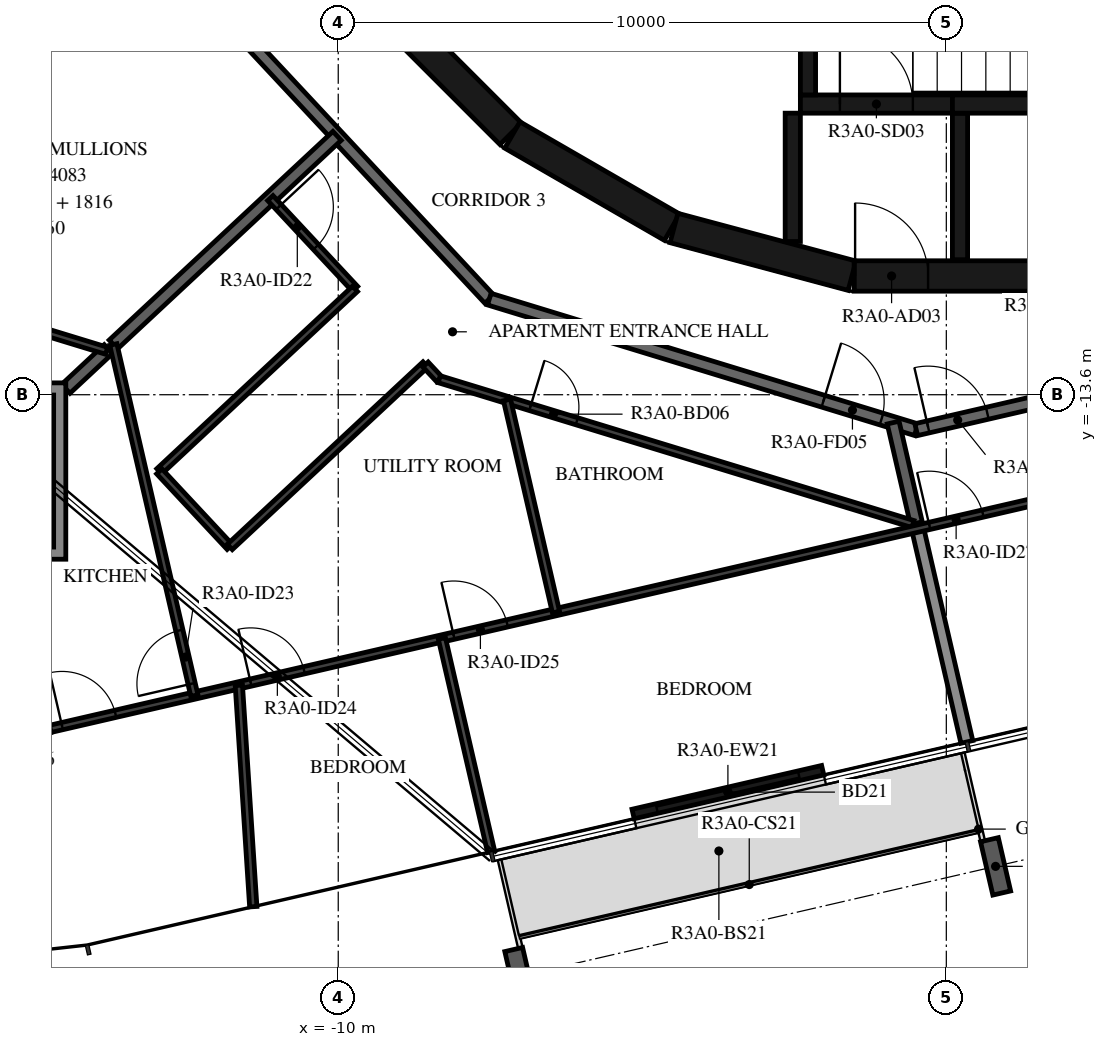
"""IFC4 building model, lengths in metres.
Left out: names, types, materials, properties, quantities, classifications, styles, units other than length and angle.
Written with IfcOpenShell. Run it as: python <this file> out.ifc"""

import sys

from ifc_helpers import new_model, si_unit, direction, frame, frame_2d, origin, origin_2d, place, context, subcontext, project, spatial, polyline, rectangle, i_section, outline, extrude, element, fill, save


model = new_model("IFC4")
c1 = context("Model", 3, precision=1e-05, world=origin(), true_north=direction((0.0, 1.0)))
c2 = subcontext(c1, "Body", "Model", "MODEL_VIEW")
j1 = project(units=[si_unit("LENGTHUNIT", "METRE"), si_unit("PLANEANGLEUNIT", "RADIAN")], contexts=[c1])
p1 = place(None, origin())
s1 = spatial("IfcSite", under=j1, at=p1, CompositionType="ELEMENT")
p2 = place(p1, origin())
s2 = spatial("IfcBuilding", under=s1, at=p2, CompositionType="ELEMENT")
p3 = place(p2, frame((0.0, 0.0, 120.4)))
s3 = spatial("IfcBuildingStorey", under=s2, at=p3, CompositionType="ELEMENT", Elevation=120.4)
for number, where, z_axis, x_axis in (
    (1, (-7.013, -23.162, -0.38), (0.0, 0.0, 1.0), (-0.974, -0.225, 0.0)),
    (2, (0.81, -21.356, -0.38), (0.0, 0.0, 1.0), (-0.974, -0.225, 0.0)),
):
    element("IfcColumn", number, at=place(p3, frame(where, z_axis=z_axis, x_axis=x_axis)), inside=s3, PredefinedType="COLUMN", context=c2, shape_type="SweptSolid", body=[
        extrude(i_section(OverallWidth=0.3, OverallDepth=0.9, WebThickness=0.019, FlangeThickness=0.035, FilletRadius=0.03, at=origin_2d()), origin(), (0.0, 0.0, 1.0), 3.5),
    ])
p4 = place(p3, frame((-5.151, -20.495, 0.0), z_axis=(0.0, 0.0, 1.0), x_axis=(0.974377048991, 0.224920800284, 0.0)))
e3 = element("IfcWall", 3, at=p4, inside=s3, PredefinedType="STANDARD", context=c2, shape_type="SweptSolid", body=[
    extrude(rectangle(XDim=3.2, YDim=0.16, at=frame_2d((1.6, 0.0))), origin(), (0.0, 0.0, 1.0), 3.12),
])
p5 = place(p4, frame((0.4, 0.0, 0.0)))
e4 = element("IfcOpeningElement", 4, at=p5, cuts=e3, PredefinedType="OPENING", context=c2, shape_type="SweptSolid", body=[
    extrude(rectangle(XDim=2.4, YDim=2.4, at=frame_2d((1.2, 1.2))), frame((0.0, 0.09, 0.0), z_axis=(0.0, -1.0, 0.0), x_axis=(1.0, 0.0, 0.0)), (0.0, 0.0, 1.0), 0.18),
])
p6 = place(p3, frame((-9.308, -7.164, 0.0), z_axis=(0.0, 0.0, 1.0), x_axis=(0.707106781187, -0.707106781187, 0.0)))
e5 = element("IfcWall", 5, at=p6, inside=s3, PredefinedType="SHEAR", context=c2, shape_type="SweptSolid", body=[
    extrude(rectangle(XDim=3.032, YDim=0.5, at=frame_2d((1.516, 0.0))), origin(), (0.0, 0.0, 1.0), 3.12),
])
for number, where, z_axis, x_axis in (
    (6, (-7.137, -9.329, 0.0), (0.0, 0.0, 1.0), (0.866, -0.5, 0.0)),
    (7, (-4.479, -10.858, 0.0), (0.0, 0.0, 1.0), (0.966, -0.259, 0.0)),
):
    element("IfcWall", number, at=place(p3, frame(where, z_axis=z_axis, x_axis=x_axis)), inside=s3, PredefinedType="SHEAR", context=c2, shape_type="SweptSolid", body=[
        extrude(rectangle(XDim=3.033, YDim=0.5, at=frame_2d((1.516, 0.0))), origin(), (0.0, 0.0, 1.0), 3.12),
    ])
p7 = place(p3, frame((-1.516, -11.647, 0.0), z_axis=(0.0, 0.0, 1.0), x_axis=(1.0, 0.0, 0.0)))
e8 = element("IfcWall", 8, at=p7, inside=s3, PredefinedType="SHEAR", context=c2, shape_type="SweptSolid", body=[
    extrude(rectangle(XDim=3.033, YDim=0.5, at=frame_2d((1.516, 0.0))), origin(), (0.0, 0.0, 1.0), 3.12),
])
p8 = place(p7, frame((0.016, 0.0, 0.0)))
e9 = element("IfcOpeningElement", 9, at=p8, cuts=e8, PredefinedType="OPENING", context=c2, shape_type="SweptSolid", body=[
    extrude(rectangle(XDim=1.2, YDim=2.1, at=frame_2d((0.6, 1.05))), frame((0.0, 0.26, 0.0), z_axis=(0.0, -1.0, 0.0), x_axis=(1.0, 0.0, 0.0)), (0.0, 0.0, 1.0), 0.52),
])
p9 = place(p3, frame((-2.275, -8.67, 0.0), z_axis=(0.0, 0.0, 1.0), x_axis=(0.0, 1.0, 0.0)))
e10 = element("IfcWall", 10, at=p9, inside=s3, PredefinedType="SHEAR", context=c2, shape_type="SweptSolid", body=[
    extrude(rectangle(XDim=3.32, YDim=0.25, at=frame_2d((1.66, 0.0))), origin(), (0.0, 0.0, 1.0), 3.12),
])
p10 = place(p3, frame((0.1, -8.82, 0.0), z_axis=(0.0, 0.0, 1.0), x_axis=(1.0, 0.0, 0.0)))
e11 = element("IfcWall", 11, at=p10, inside=s3, PredefinedType="SHEAR", context=c2, shape_type="SweptSolid", body=[
    extrude(rectangle(XDim=4.55, YDim=0.3, at=frame_2d((2.275, 0.0))), origin(), (0.0, 0.0, 1.0), 3.12),
])
p11 = place(p3, frame((-2.4, -8.82, 0.0), z_axis=(0.0, 0.0, 1.0), x_axis=(1.0, 0.0, 0.0)))
e12 = element("IfcWall", 12, at=p11, inside=s3, PredefinedType="SHEAR", context=c2, shape_type="SweptSolid", body=[
    extrude(rectangle(XDim=2.5, YDim=0.3, at=frame_2d((1.25, 0.0))), origin(), (0.0, 0.0, 1.0), 3.12),
])
p12 = place(p11, frame((0.65, 0.0, 0.0)))
e13 = element("IfcOpeningElement", 13, at=p12, cuts=e12, PredefinedType="OPENING", context=c2, shape_type="SweptSolid", body=[
    extrude(rectangle(XDim=1.2, YDim=2.1, at=frame_2d((0.6, 1.05))), frame((0.0, 0.16, 0.0), z_axis=(0.0, -1.0, 0.0), x_axis=(1.0, 0.0, 0.0)), (0.0, 0.0, 1.0), 0.32),
])
p13 = place(p3, frame((-2.525, -8.97, 0.0), z_axis=(0.0, 0.0, 1.0), x_axis=(0.0, -1.0, 0.0)))
e14 = element("IfcWall", 14, at=p13, inside=s3, PredefinedType="SHEAR", context=c2, shape_type="SweptSolid", body=[
    extrude(rectangle(XDim=2.11, YDim=0.25, at=frame_2d((1.055, 0.0))), origin(), (0.0, 0.0, 1.0), 3.12),
])
p14 = place(p3, frame((0.225, -8.97, 0.0), z_axis=(0.0, 0.0, 1.0), x_axis=(0.0, -1.0, 0.0)))
e15 = element("IfcWall", 15, at=p14, inside=s3, PredefinedType="SHEAR", context=c2, shape_type="SweptSolid", body=[
    extrude(rectangle(XDim=2.41, YDim=0.25, at=frame_2d((1.205, 0.0))), origin(), (0.0, 0.0, 1.0), 3.12),
])
p15 = place(p3, frame((-12.523, -6.659, 0.0), z_axis=(0.0, 0.0, 1.0), x_axis=(0.682001841105, -0.731350455479, 0.0)))
e16 = element("IfcWall", 16, at=p15, inside=s3, PredefinedType="STANDARD", context=c2, shape_type="SweptSolid", body=[
    extrude(rectangle(XDim=7.342, YDim=0.2, at=frame_2d((3.671, 0.0))), origin(), (0.0, 0.0, 1.0), 3.12),
])
p16 = place(p3, frame((-7.516, -12.028, 0.0), z_axis=(0.0, 0.0, 1.0), x_axis=(0.956306642771, -0.292365533182, 0.0)))
e17 = element("IfcWall", 17, at=p16, inside=s3, PredefinedType="STANDARD", context=c2, shape_type="SweptSolid", body=[
    extrude(rectangle(XDim=7.342, YDim=0.2, at=frame_2d((3.671, 0.0))), origin(), (0.0, 0.0, 1.0), 3.12),
])
p17 = place(p16, frame((5.745, 0.0, 0.0)))
e18 = element("IfcOpeningElement", 18, at=p17, cuts=e17, PredefinedType="OPENING", context=c2, shape_type="SweptSolid", body=[
    extrude(rectangle(XDim=1.0, YDim=2.1, at=frame_2d((0.5, 1.05))), frame((0.0, 0.11, 0.0), z_axis=(0.0, -1.0, 0.0), x_axis=(1.0, 0.0, 0.0)), (0.0, 0.0, 1.0), 0.22),
])
p18 = place(p3, frame((-0.495, -14.175, 0.0), z_axis=(0.0, 0.0, 1.0), x_axis=(0.974376622151, 0.224922649383, 0.0)))
e19 = element("IfcWall", 19, at=p18, inside=s3, PredefinedType="STANDARD", context=c2, shape_type="SweptSolid", body=[
    extrude(rectangle(XDim=7.342, YDim=0.2, at=frame_2d((3.671, 0.0))), origin(), (0.0, 0.0, 1.0), 3.12),
])
p19 = place(p18, frame((0.2, 0.0, 0.0)))
e20 = element("IfcOpeningElement", 20, at=p19, cuts=e19, PredefinedType="OPENING", context=c2, shape_type="SweptSolid", body=[
    extrude(rectangle(XDim=1.0, YDim=2.1, at=frame_2d((0.5, 1.05))), frame((0.0, 0.11, 0.0), z_axis=(0.0, -1.0, 0.0), x_axis=(1.0, 0.0, 0.0)), (0.0, 0.0, 1.0), 0.22),
])
p20 = place(p3, frame((-13.699, -12.774, 0.0), z_axis=(0.0, 0.0, 1.0), x_axis=(0.731353758457, 0.681998299111, 0.0)))
e21 = element("IfcWall", 21, at=p20, inside=s3, PredefinedType="STANDARD", context=c2, shape_type="SweptSolid", body=[
    extrude(rectangle(XDim=5.031, YDim=0.2, at=frame_2d((2.515, 0.0))), origin(), (0.0, 0.0, 1.0), 3.12),
])
p21 = place(p3, frame((-14.48, -13.503, 0.0), z_axis=(0.0, 0.0, 1.0), x_axis=(0.73152991834, 0.681809341806, 0.0)))
e22 = element("IfcWall", 22, at=p21, inside=s3, PredefinedType="STANDARD", context=c2, shape_type="SweptSolid", body=[
    extrude(rectangle(XDim=0.958, YDim=0.2, at=frame_2d((0.479, 0.0))), origin(), (0.0, 0.0, 1.0), 3.12),
])
p22 = place(p3, frame((-0.492, -15.713, 0.0), z_axis=(0.0, 0.0, 1.0), x_axis=(-0.224974992875, 0.97436453783, 0.0)))
e23 = element("IfcWall", 23, at=p22, inside=s3, PredefinedType="STANDARD", context=c2, shape_type="SweptSolid", body=[
    extrude(rectangle(XDim=1.698, YDim=0.2, at=frame_2d((0.849, 0.0))), origin(), (0.0, 0.0, 1.0), 3.12),
])
p23 = place(p3, frame((0.338, -19.31, 0.0), z_axis=(0.0, 0.0, 1.0), x_axis=(-0.224943703639, 0.9743717618, 0.0)))
e24 = element("IfcWall", 24, at=p23, inside=s3, PredefinedType="STANDARD", context=c2, shape_type="SweptSolid", body=[
    extrude(rectangle(XDim=3.6, YDim=0.2, at=frame_2d((1.8, 0.0))), origin(), (0.0, 0.0, 1.0), 2.73),
])
p24 = place(p3, frame((-19.404, -11.167, 0.0), z_axis=(0.0, 0.0, 1.0), x_axis=(0.956314306829, -0.292340463423, 0.0)))
e25 = element("IfcWall", 25, at=p24, inside=s3, PredefinedType="PARTITIONING", context=c2, shape_type="SweptSolid", body=[
    extrude(rectangle(XDim=5.85, YDim=0.12, at=frame_2d((2.925, 0.0))), origin(), (0.0, 0.0, 1.0), 3.12),
])
p25 = place(p24, frame((0.3, 0.0, 0.0)))
e26 = element("IfcOpeningElement", 26, at=p25, cuts=e25, PredefinedType="OPENING", context=c2, shape_type="SweptSolid", body=[
    extrude(rectangle(XDim=0.9, YDim=2.1, at=frame_2d((0.45, 1.05))), frame((0.0, 0.07, 0.0), z_axis=(0.0, -1.0, 0.0), x_axis=(1.0, 0.0, 0.0)), (0.0, 0.0, 1.0), 0.14),
])
p26 = place(p3, frame((-11.117, -10.366, 0.0), z_axis=(0.0, 0.0, 1.0), x_axis=(0.682041233274, -0.731313719353, 0.0)))
e27 = element("IfcWall", 27, at=p26, inside=s3, PredefinedType="PARTITIONING", context=c2, shape_type="SweptSolid", body=[
    extrude(rectangle(XDim=2.042, YDim=0.12, at=frame_2d((1.021, 0.0))), origin(), (0.0, 0.0, 1.0), 3.12),
])
p27 = place(p26, frame((0.2, 0.0, 0.0)))
e28 = element("IfcOpeningElement", 28, at=p27, cuts=e27, PredefinedType="OPENING", context=c2, shape_type="SweptSolid", body=[
    extrude(rectangle(XDim=0.9, YDim=2.1, at=frame_2d((0.45, 1.05))), frame((0.0, 0.07, 0.0), z_axis=(0.0, -1.0, 0.0), x_axis=(1.0, 0.0, 0.0)), (0.0, 0.0, 1.0), 0.14),
])
p28 = place(p3, frame((-9.724, -11.859, 0.0), z_axis=(0.0, 0.0, 1.0), x_axis=(-0.731365154613, -0.681986078023, 0.0)))
e29 = element("IfcWall", 29, at=p28, inside=s3, PredefinedType="PARTITIONING", context=c2, shape_type="SweptSolid", body=[
    extrude(rectangle(XDim=4.4, YDim=0.12, at=frame_2d((2.2, 0.0))), origin(), (0.0, 0.0, 1.0), 3.12),
])
p29 = place(p3, frame((-12.943, -14.86, 0.0), z_axis=(0.0, 0.0, 1.0), x_axis=(0.682046998737, -0.731308342297, 0.0)))
e30 = element("IfcWall", 30, at=p29, inside=s3, PredefinedType="PARTITIONING", context=c2, shape_type="SweptSolid", body=[
    extrude(rectangle(XDim=1.7, YDim=0.12, at=frame_2d((0.85, 0.0))), origin(), (0.0, 0.0, 1.0), 3.12),
])
p30 = place(p3, frame((-11.783, -16.104, 0.0), z_axis=(0.0, 0.0, 1.0), x_axis=(0.731365154613, 0.681986078023, 0.0)))
e31 = element("IfcWall", 31, at=p30, inside=s3, PredefinedType="PARTITIONING", context=c2, shape_type="SweptSolid", body=[
    extrude(rectangle(XDim=4.4, YDim=0.12, at=frame_2d((2.2, 0.0))), origin(), (0.0, 0.0, 1.0), 3.12),
])
p31 = place(p3, frame((-8.565, -13.103, 0.0), z_axis=(0.0, 0.0, 1.0), x_axis=(0.681636048219, -0.731691395172, 0.0)))
e32 = element("IfcWall", 32, at=p31, inside=s3, PredefinedType="PARTITIONING", context=c2, shape_type="SweptSolid", body=[
    extrude(rectangle(XDim=0.332, YDim=0.12, at=frame_2d((0.166, 0.0))), origin(), (0.0, 0.0, 1.0), 3.12),
])
p32 = place(p3, frame((-8.339, -13.345, 0.0), z_axis=(0.0, 0.0, 1.0), x_axis=(0.956310145342, -0.292354076276, 0.0)))
e33 = element("IfcWall", 33, at=p32, inside=s3, PredefinedType="PARTITIONING", context=c2, shape_type="SweptSolid", body=[
    extrude(rectangle(XDim=8.146, YDim=0.12, at=frame_2d((4.073, 0.0))), origin(), (0.0, 0.0, 1.0), 3.12),
])
p33 = place(p32, frame((1.565, 0.0, 0.0)))
e34 = element("IfcOpeningElement", 34, at=p33, cuts=e33, PredefinedType="OPENING", context=c2, shape_type="SweptSolid", body=[
    extrude(rectangle(XDim=0.8, YDim=2.1, at=frame_2d((0.4, 1.05))), frame((0.0, 0.07, 0.0), z_axis=(0.0, -1.0, 0.0), x_axis=(1.0, 0.0, 0.0)), (0.0, 0.0, 1.0), 0.14),
])
p34 = place(p3, frame((-14.736, -19.095, 0.0), z_axis=(0.0, 0.0, 1.0), x_axis=(0.974369132722, 0.224955091516, 0.0)))
e35 = element("IfcWall", 35, at=p34, inside=s3, PredefinedType="PARTITIONING", context=c2, shape_type="SweptSolid", body=[
    extrude(rectangle(XDim=18.654, YDim=0.12, at=frame_2d((9.327, 0.0))), origin(), (0.0, 0.0, 1.0), 3.12),
])
p35 = place(p34, frame((3.383, 0.0, 0.0)))
e36 = element("IfcOpeningElement", 36, at=p35, cuts=e35, PredefinedType="OPENING", context=c2, shape_type="SweptSolid", body=[
    extrude(rectangle(XDim=0.9, YDim=2.1, at=frame_2d((0.45, 1.05))), frame((0.0, 0.07, 0.0), z_axis=(0.0, -1.0, 0.0), x_axis=(1.0, 0.0, 0.0)), (0.0, 0.0, 1.0), 0.14),
])
p36 = place(p34, frame((6.81, 0.0, 0.0)))
e37 = element("IfcOpeningElement", 37, at=p36, cuts=e35, PredefinedType="OPENING", context=c2, shape_type="SweptSolid", body=[
    extrude(rectangle(XDim=0.9, YDim=2.1, at=frame_2d((0.45, 1.05))), frame((0.0, 0.07, 0.0), z_axis=(0.0, -1.0, 0.0), x_axis=(1.0, 0.0, 0.0)), (0.0, 0.0, 1.0), 0.14),
])
p37 = place(p34, frame((0.2, 0.0, 0.0)))
e38 = element("IfcOpeningElement", 38, at=p37, cuts=e35, PredefinedType="OPENING", context=c2, shape_type="SweptSolid", body=[
    extrude(rectangle(XDim=0.9, YDim=2.1, at=frame_2d((0.45, 1.05))), frame((0.0, 0.07, 0.0), z_axis=(0.0, -1.0, 0.0), x_axis=(1.0, 0.0, 0.0)), (0.0, 0.0, 1.0), 0.14),
])
p38 = place(p34, frame((14.839, 0.0, 0.0)))
e39 = element("IfcOpeningElement", 39, at=p38, cuts=e35, PredefinedType="OPENING", context=c2, shape_type="SweptSolid", body=[
    extrude(rectangle(XDim=0.9, YDim=2.1, at=frame_2d((0.45, 1.05))), frame((0.0, 0.07, 0.0), z_axis=(0.0, -1.0, 0.0), x_axis=(1.0, 0.0, 0.0)), (0.0, 0.0, 1.0), 0.14),
])
p39 = place(p3, frame((-12.366, -18.548, 0.0), z_axis=(0.0, 0.0, 1.0), x_axis=(-0.224958805164, 0.974368275335, 0.0)))
e40 = element("IfcWall", 40, at=p39, inside=s3, PredefinedType="PARTITIONING", context=c2, shape_type="SweptSolid", body=[
    extrude(rectangle(XDim=5.926, YDim=0.12, at=frame_2d((2.963, 0.0))), origin(), (0.0, 0.0, 1.0), 3.12),
])
p40 = place(p39, frame((0.2, 0.0, 0.0)))
e41 = element("IfcOpeningElement", 41, at=p40, cuts=e40, PredefinedType="OPENING", context=c2, shape_type="SweptSolid", body=[
    extrude(rectangle(XDim=0.9, YDim=2.1, at=frame_2d((0.45, 1.05))), frame((0.0, 0.07, 0.0), z_axis=(0.0, -1.0, 0.0), x_axis=(1.0, 0.0, 0.0)), (0.0, 0.0, 1.0), 0.14),
])
p41 = place(p3, frame((-11.397, -22.019, 0.0), z_axis=(0.0, 0.0, 1.0), x_axis=(-0.065124052048, 0.997877175731, 0.0)))
e42 = element("IfcWall", 42, at=p41, inside=s3, PredefinedType="PARTITIONING", context=c2, shape_type="SweptSolid", body=[
    extrude(rectangle(XDim=3.648, YDim=0.12, at=frame_2d((1.824, 0.0))), origin(), (0.0, 0.0, 1.0), 3.12),
])
p42 = place(p3, frame((-6.419, -17.175, 0.0), z_axis=(0.0, 0.0, 1.0), x_axis=(-0.224979003559, 0.974363611778, 0.0)))
e43 = element("IfcWall", 43, at=p42, inside=s3, PredefinedType="PARTITIONING", context=c2, shape_type="SweptSolid", body=[
    extrude(rectangle(XDim=3.581, YDim=0.12, at=frame_2d((1.791, 0.0))), origin(), (0.0, 0.0, 1.0), 3.12),
])
p43 = place(p3, frame((-7.486, -21.116, 0.0), z_axis=(0.0, 0.0, 1.0), x_axis=(-0.224943703639, 0.9743717618, 0.0)))
e44 = element("IfcWall", 44, at=p43, inside=s3, PredefinedType="PARTITIONING", context=c2, shape_type="SweptSolid", body=[
    extrude(rectangle(XDim=3.6, YDim=0.12, at=frame_2d((1.8, 0.0))), origin(), (0.0, 0.0, 1.0), 2.73),
])
p44 = place(p3, origin())
e45 = element("IfcWall", 45, at=p44, inside=s3, PredefinedType="STANDARD", context=c2, shape_type="SweptSolid", body=[
    extrude(outline(polyline([(-14.48, -13.405), (-14.48, -16.305), (-17.38, -16.305), (-17.38, -13.405), (-14.48, -13.405)]), holes=[polyline([(-17.18, -16.105), (-14.68, -16.105), (-14.68, -13.605), (-17.18, -13.605), (-17.18, -16.105)])]), origin(), (0.0, 0.0, 1.0), 3.12),
])
p45 = place(p5, origin())
e46 = element("IfcDoor", 46, at=p45, inside=s3, OperationType="DOUBLE_DOOR_SLIDING", PredefinedType="DOOR", context=c2, shape_type="SweptSolid", body=[
    extrude(rectangle(XDim=2.4, YDim=2.4, at=frame_2d((1.2, 1.2))), frame((0.0, 0.025, 0.0), z_axis=(0.0, -1.0, 0.0), x_axis=(1.0, 0.0, 0.0)), (0.0, 0.0, 1.0), 0.05),
])
fill(e4, e46)
p46 = place(p12, origin())
e47 = element("IfcDoor", 47, at=p46, inside=s3, OperationType="SINGLE_SWING_LEFT", PredefinedType="DOOR", context=c2, shape_type="SweptSolid", body=[
    extrude(rectangle(XDim=1.2, YDim=2.1, at=frame_2d((0.6, 1.05))), frame((0.0, 0.025, 0.0), z_axis=(0.0, -1.0, 0.0), x_axis=(1.0, 0.0, 0.0)), (0.0, 0.0, 1.0), 0.05),
])
fill(e13, e47)
p47 = place(p8, origin())
e48 = element("IfcDoor", 48, at=p47, inside=s3, OperationType="SINGLE_SWING_RIGHT", PredefinedType="DOOR", context=c2, shape_type="SweptSolid", body=[
    extrude(rectangle(XDim=1.2, YDim=2.1, at=frame_2d((0.6, 1.05))), frame((0.0, 0.025, 0.0), z_axis=(0.0, -1.0, 0.0), x_axis=(1.0, 0.0, 0.0)), (0.0, 0.0, 1.0), 0.05),
])
fill(e9, e48)
p48 = place(p17, origin())
e49 = element("IfcDoor", 49, at=p48, inside=s3, OperationType="SINGLE_SWING_LEFT", PredefinedType="DOOR", context=c2, shape_type="SweptSolid", body=[
    extrude(rectangle(XDim=1.0, YDim=2.1, at=frame_2d((0.5, 1.05))), frame((0.0, 0.025, 0.0), z_axis=(0.0, -1.0, 0.0), x_axis=(1.0, 0.0, 0.0)), (0.0, 0.0, 1.0), 0.05),
])
fill(e18, e49)
p49 = place(p27, origin())
e50 = element("IfcDoor", 50, at=p49, inside=s3, OperationType="SINGLE_SWING_LEFT", PredefinedType="DOOR", context=c2, shape_type="SweptSolid", body=[
    extrude(rectangle(XDim=0.9, YDim=2.1, at=frame_2d((0.45, 1.05))), frame((0.0, 0.025, 0.0), z_axis=(0.0, -1.0, 0.0), x_axis=(1.0, 0.0, 0.0)), (0.0, 0.0, 1.0), 0.05),
])
fill(e28, e50)
p50 = place(p33, origin())
e51 = element("IfcDoor", 51, at=p50, inside=s3, OperationType="SINGLE_SWING_LEFT", PredefinedType="DOOR", context=c2, shape_type="SweptSolid", body=[
    extrude(rectangle(XDim=0.8, YDim=2.1, at=frame_2d((0.4, 1.05))), frame((0.0, 0.025, 0.0), z_axis=(0.0, -1.0, 0.0), x_axis=(1.0, 0.0, 0.0)), (0.0, 0.0, 1.0), 0.05),
])
fill(e34, e51)
p51 = place(p40, origin())
e52 = element("IfcDoor", 52, at=p51, inside=s3, OperationType="SINGLE_SWING_LEFT", PredefinedType="DOOR", context=c2, shape_type="SweptSolid", body=[
    extrude(rectangle(XDim=0.9, YDim=2.1, at=frame_2d((0.45, 1.05))), frame((0.0, 0.025, 0.0), z_axis=(0.0, -1.0, 0.0), x_axis=(1.0, 0.0, 0.0)), (0.0, 0.0, 1.0), 0.05),
])
fill(e41, e52)
p52 = place(p35, origin())
e53 = element("IfcDoor", 53, at=p52, inside=s3, OperationType="SINGLE_SWING_LEFT", PredefinedType="DOOR", context=c2, shape_type="SweptSolid", body=[
    extrude(rectangle(XDim=0.9, YDim=2.1, at=frame_2d((0.45, 1.05))), frame((0.0, 0.025, 0.0), z_axis=(0.0, -1.0, 0.0), x_axis=(1.0, 0.0, 0.0)), (0.0, 0.0, 1.0), 0.05),
])
fill(e36, e53)
p53 = place(p36, origin())
e54 = element("IfcDoor", 54, at=p53, inside=s3, OperationType="SINGLE_SWING_LEFT", PredefinedType="DOOR", context=c2, shape_type="SweptSolid", body=[
    extrude(rectangle(XDim=0.9, YDim=2.1, at=frame_2d((0.45, 1.05))), frame((0.0, 0.025, 0.0), z_axis=(0.0, -1.0, 0.0), x_axis=(1.0, 0.0, 0.0)), (0.0, 0.0, 1.0), 0.05),
])
fill(e37, e54)
p54 = place(p37, origin())
e55 = element("IfcDoor", 55, at=p54, inside=s3, OperationType="SINGLE_SWING_RIGHT", PredefinedType="DOOR", context=c2, shape_type="SweptSolid", body=[
    extrude(rectangle(XDim=0.9, YDim=2.1, at=frame_2d((0.45, 1.05))), frame((0.0, 0.025, 0.0), z_axis=(0.0, -1.0, 0.0), x_axis=(1.0, 0.0, 0.0)), (0.0, 0.0, 1.0), 0.05),
])
fill(e38, e55)
p55 = place(p19, origin())
e56 = element("IfcDoor", 56, at=p55, inside=s3, OperationType="SINGLE_SWING_LEFT", PredefinedType="DOOR", context=c2, shape_type="SweptSolid", body=[
    extrude(rectangle(XDim=1.0, YDim=2.1, at=frame_2d((0.5, 1.05))), frame((0.0, 0.025, 0.0), z_axis=(0.0, -1.0, 0.0), x_axis=(1.0, 0.0, 0.0)), (0.0, 0.0, 1.0), 0.05),
])
fill(e20, e56)
p56 = place(p38, origin())
e57 = element("IfcDoor", 57, at=p56, inside=s3, OperationType="SINGLE_SWING_LEFT", PredefinedType="DOOR", context=c2, shape_type="SweptSolid", body=[
    extrude(rectangle(XDim=0.9, YDim=2.1, at=frame_2d((0.45, 1.05))), frame((0.0, 0.025, 0.0), z_axis=(0.0, -1.0, 0.0), x_axis=(1.0, 0.0, 0.0)), (0.0, 0.0, 1.0), 0.05),
])
fill(e39, e57)
save(model, sys.argv[1])
